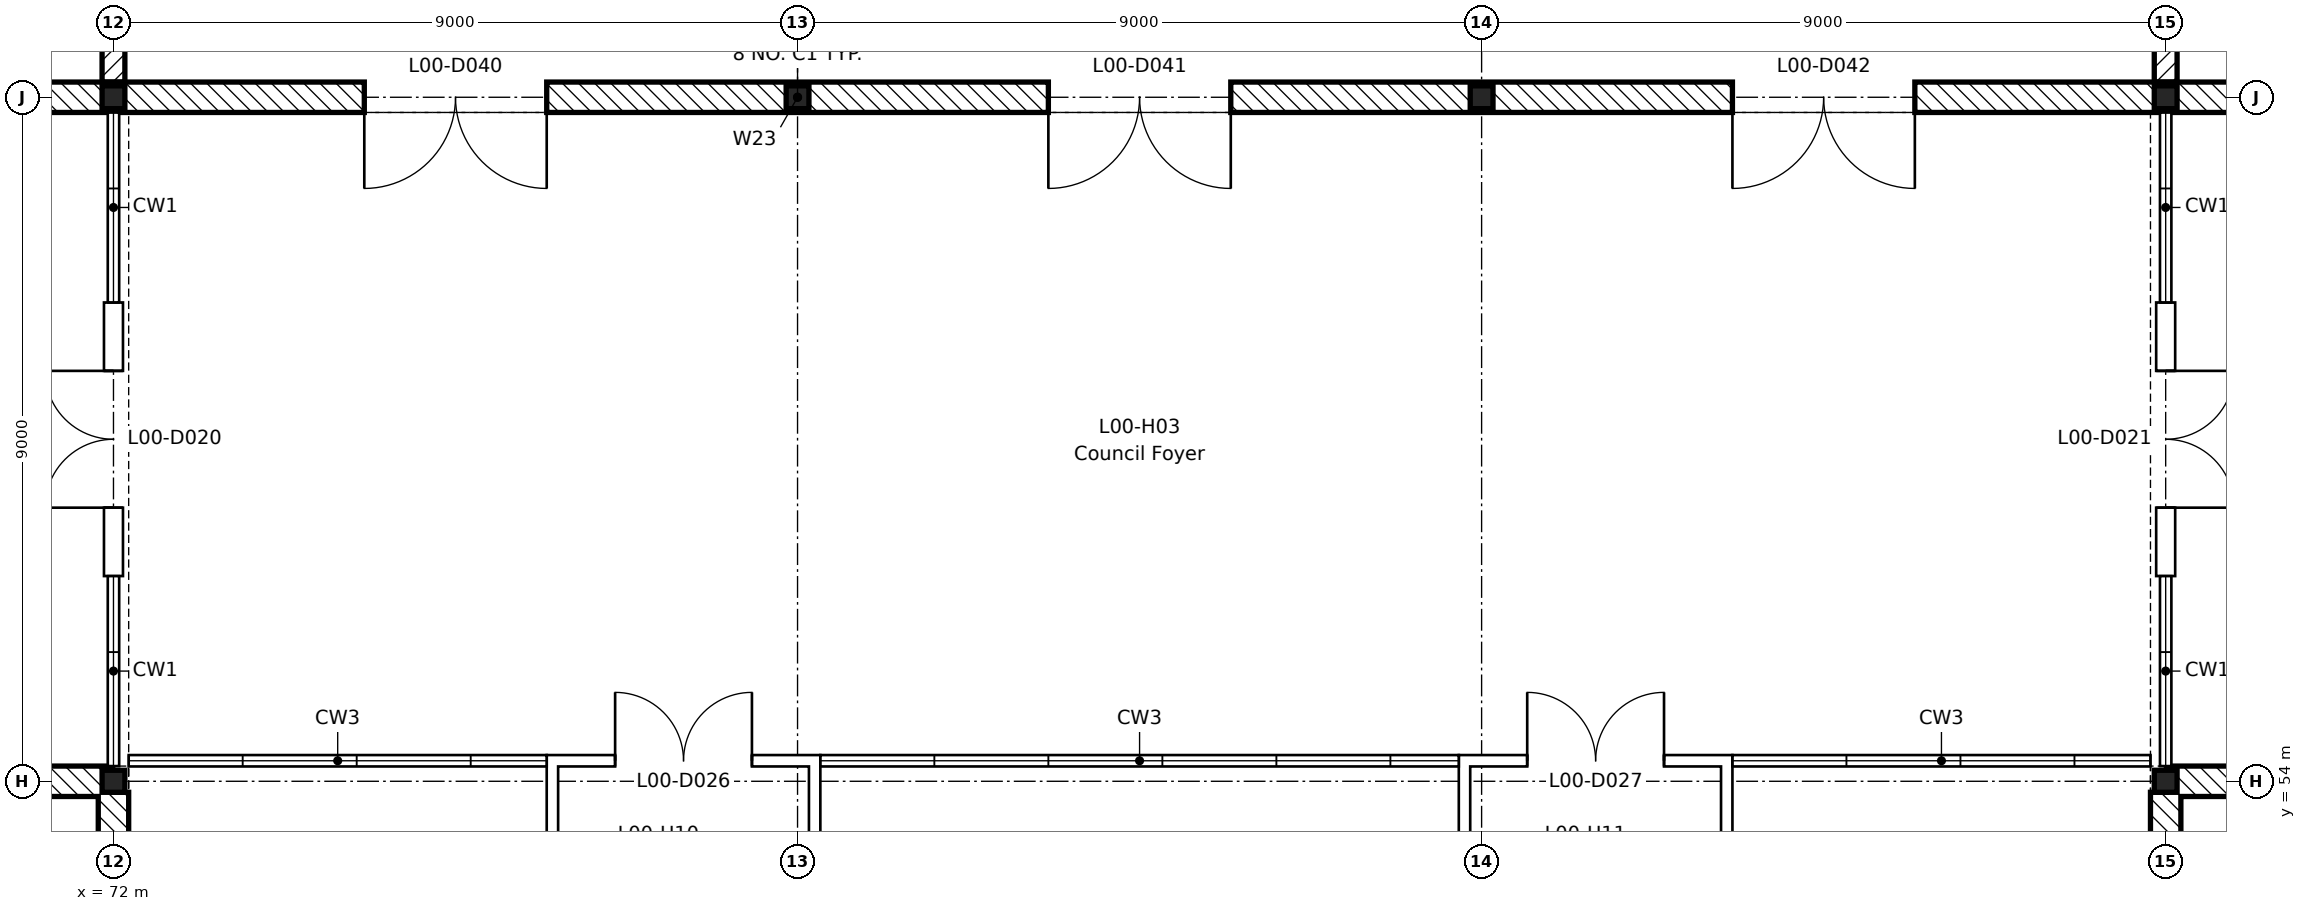
"""IFC4 building model, lengths in metres.
Left out: names, types, materials, properties, quantities, classifications, styles, units other than length and angle.
Written with IfcOpenShell. Run it as: python <this file> out.ifc"""

import sys

from ifc_helpers import new_model, si_unit, direction, frame, frame_2d, origin, origin_2d, place, context, subcontext, project, spatial, rectangle, i_section, extrude, element, fill, save


model = new_model("IFC4")
c1 = context("Model", 3, precision=1e-05, world=origin(), true_north=direction((0.0, 1.0)))
c2 = subcontext(c1, "Body", "Model", "MODEL_VIEW")
j1 = project(units=[si_unit("LENGTHUNIT", "METRE"), si_unit("PLANEANGLEUNIT", "RADIAN")], contexts=[c1])
p1 = place(None, origin())
s1 = spatial("IfcSite", under=j1, at=p1, CompositionType="ELEMENT")
p2 = place(p1, origin())
s2 = spatial("IfcBuilding", under=s1, at=p2, CompositionType="ELEMENT")
p3 = place(p2, origin())
s3 = spatial("IfcBuildingStorey", under=s2, at=p3, CompositionType="ELEMENT", Elevation=0.0)
for number, where, z_axis, x_axis in (
    (1, (72.0, 54.0, -0.6), (0.0, 0.0, 1.0), (1.0, 0.0, 0.0)),
    (2, (99.0, 54.0, -0.6), (0.0, 0.0, 1.0), (1.0, 0.0, 0.0)),
):
    element("IfcColumn", number, at=place(p3, frame(where, z_axis=z_axis, x_axis=x_axis)), inside=s3, PredefinedType="COLUMN", context=c2, shape_type="SweptSolid", body=[
        extrude(i_section(OverallWidth=0.3, OverallDepth=0.29, WebThickness=0.009, FlangeThickness=0.014, FilletRadius=0.027, at=origin_2d()), origin(), (0.0, 0.0, 1.0), 5.8),
    ])
for number, where, z_axis, x_axis in (
    (3, (81.0, 63.0, -0.6), (0.0, 0.0, 1.0), (1.0, 0.0, 0.0)),
    (4, (90.0, 63.0, -0.6), (0.0, 0.0, 1.0), (1.0, 0.0, 0.0)),
    (5, (72.0, 63.0, -0.6), (0.0, 0.0, 1.0), (1.0, 0.0, 0.0)),
    (6, (99.0, 63.0, -0.6), (0.0, 0.0, 1.0), (1.0, 0.0, 0.0)),
):
    element("IfcColumn", number, at=place(p3, frame(where, z_axis=z_axis, x_axis=x_axis)), inside=s3, PredefinedType="COLUMN", context=c2, shape_type="SweptSolid", body=[
        extrude(i_section(OverallWidth=0.3, OverallDepth=0.3, WebThickness=0.011, FlangeThickness=0.019, FilletRadius=0.027, at=origin_2d()), origin(), (0.0, 0.0, 1.0), 5.8),
    ])
p4 = place(p3, frame((72.0, 63.2, 0.0), z_axis=(0.0, 0.0, 1.0), x_axis=(0.0, 1.0, 0.0)))
e7 = element("IfcWall", 7, at=p4, inside=s3, PredefinedType="SHEAR", context=c2, shape_type="SweptSolid", body=[
    extrude(rectangle(XDim=8.95, YDim=0.3, at=frame_2d((4.475, 0.0))), origin(), (0.0, 0.0, 1.0), 5.2),
])
p5 = place(p4, frame((0.85, 0.0, 0.0)))
e8 = element("IfcOpeningElement", 8, at=p5, cuts=e7, PredefinedType="OPENING", context=c2, shape_type="SweptSolid", body=[
    extrude(rectangle(XDim=1.1, YDim=2.1, at=frame_2d((0.55, 1.05))), frame((0.0, 0.16, 0.0), z_axis=(0.0, -1.0, 0.0), x_axis=(1.0, 0.0, 0.0)), (0.0, 0.0, 1.0), 0.32),
])
p6 = place(p3, frame((99.0, 63.2, 0.0), z_axis=(0.0, 0.0, 1.0), x_axis=(0.0, 1.0, 0.0)))
e9 = element("IfcWall", 9, at=p6, inside=s3, PredefinedType="SHEAR", context=c2, shape_type="SweptSolid", body=[
    extrude(rectangle(XDim=8.95, YDim=0.3, at=frame_2d((4.475, 0.0))), origin(), (0.0, 0.0, 1.0), 5.2),
])
p7 = place(p6, frame((0.85, 0.0, 0.0)))
e10 = element("IfcOpeningElement", 10, at=p7, cuts=e9, PredefinedType="OPENING", context=c2, shape_type="SweptSolid", body=[
    extrude(rectangle(XDim=1.1, YDim=2.1, at=frame_2d((0.55, 1.05))), frame((0.0, 0.16, 0.0), z_axis=(0.0, -1.0, 0.0), x_axis=(1.0, 0.0, 0.0)), (0.0, 0.0, 1.0), 0.32),
])
p8 = place(p3, frame((64.509, 54.0, 0.0), z_axis=(0.0, 0.0, 1.0), x_axis=(1.0, 0.0, 0.0)))
e11 = element("IfcWall", 11, at=p8, inside=s3, PredefinedType="STANDARD", context=c2, shape_type="SweptSolid", body=[
    extrude(rectangle(XDim=7.481, YDim=0.4, at=frame_2d((3.741, 0.0))), origin(), (0.0, 0.0, 1.0), 4.87),
])
p9 = place(p8, frame((4.641, 0.0, 0.6)))
e12 = element("IfcOpeningElement", 12, at=p9, cuts=e11, PredefinedType="OPENING", context=c2, shape_type="SweptSolid", body=[
    extrude(rectangle(XDim=1.2, YDim=3.9, at=frame_2d((0.6, 1.95))), frame((0.0, 0.21, 0.0), z_axis=(0.0, -1.0, 0.0), x_axis=(1.0, 0.0, 0.0)), (0.0, 0.0, 1.0), 0.42),
])
p10 = place(p3, frame((72.0, 53.855, 0.0), z_axis=(0.0, 0.0, 1.0), x_axis=(0.0, -1.0, 0.0)))
e13 = element("IfcWall", 13, at=p10, inside=s3, PredefinedType="STANDARD", context=c2, shape_type="SweptSolid", body=[
    extrude(rectangle(XDim=8.71, YDim=0.4, at=frame_2d((4.355, 0.0))), origin(), (0.0, 0.0, 1.0), 4.8),
])
p11 = place(p10, frame((6.005, 0.0, 0.6)))
e14 = element("IfcOpeningElement", 14, at=p11, cuts=e13, PredefinedType="OPENING", context=c2, shape_type="SweptSolid", body=[
    extrude(rectangle(XDim=1.2, YDim=3.9, at=frame_2d((0.6, 1.95))), frame((0.0, 0.21, 0.0), z_axis=(0.0, -1.0, 0.0), x_axis=(1.0, 0.0, 0.0)), (0.0, 0.0, 1.0), 0.42),
])
p12 = place(p10, frame((4.505, 0.0, 0.6)))
e15 = element("IfcOpeningElement", 15, at=p12, cuts=e13, PredefinedType="OPENING", context=c2, shape_type="SweptSolid", body=[
    extrude(rectangle(XDim=1.2, YDim=3.9, at=frame_2d((0.6, 1.95))), frame((0.0, 0.21, 0.0), z_axis=(0.0, -1.0, 0.0), x_axis=(1.0, 0.0, 0.0)), (0.0, 0.0, 1.0), 0.42),
])
p13 = place(p10, frame((3.005, 0.0, 0.6)))
e16 = element("IfcOpeningElement", 16, at=p13, cuts=e13, PredefinedType="OPENING", context=c2, shape_type="SweptSolid", body=[
    extrude(rectangle(XDim=1.2, YDim=3.9, at=frame_2d((0.6, 1.95))), frame((0.0, 0.21, 0.0), z_axis=(0.0, -1.0, 0.0), x_axis=(1.0, 0.0, 0.0)), (0.0, 0.0, 1.0), 0.42),
])
p14 = place(p10, frame((1.505, 0.0, 0.6)))
e17 = element("IfcOpeningElement", 17, at=p14, cuts=e13, PredefinedType="OPENING", context=c2, shape_type="SweptSolid", body=[
    extrude(rectangle(XDim=1.2, YDim=3.9, at=frame_2d((0.6, 1.95))), frame((0.0, 0.21, 0.0), z_axis=(0.0, -1.0, 0.0), x_axis=(1.0, 0.0, 0.0)), (0.0, 0.0, 1.0), 0.42),
])
p15 = place(p3, frame((99.0, 45.145, 0.0), z_axis=(0.0, 0.0, 1.0), x_axis=(0.0, 1.0, 0.0)))
e18 = element("IfcWall", 18, at=p15, inside=s3, PredefinedType="STANDARD", context=c2, shape_type="SweptSolid", body=[
    extrude(rectangle(XDim=8.71, YDim=0.4, at=frame_2d((4.355, 0.0))), origin(), (0.0, 0.0, 1.0), 4.8),
])
p16 = place(p15, frame((1.505, 0.0, 0.6)))
e19 = element("IfcOpeningElement", 19, at=p16, cuts=e18, PredefinedType="OPENING", context=c2, shape_type="SweptSolid", body=[
    extrude(rectangle(XDim=1.2, YDim=3.9, at=frame_2d((0.6, 1.95))), frame((0.0, 0.21, 0.0), z_axis=(0.0, -1.0, 0.0), x_axis=(1.0, 0.0, 0.0)), (0.0, 0.0, 1.0), 0.42),
])
p17 = place(p15, frame((3.005, 0.0, 0.6)))
e20 = element("IfcOpeningElement", 20, at=p17, cuts=e18, PredefinedType="OPENING", context=c2, shape_type="SweptSolid", body=[
    extrude(rectangle(XDim=1.2, YDim=3.9, at=frame_2d((0.6, 1.95))), frame((0.0, 0.21, 0.0), z_axis=(0.0, -1.0, 0.0), x_axis=(1.0, 0.0, 0.0)), (0.0, 0.0, 1.0), 0.42),
])
p18 = place(p15, frame((4.505, 0.0, 0.6)))
e21 = element("IfcOpeningElement", 21, at=p18, cuts=e18, PredefinedType="OPENING", context=c2, shape_type="SweptSolid", body=[
    extrude(rectangle(XDim=1.2, YDim=3.9, at=frame_2d((0.6, 1.95))), frame((0.0, 0.21, 0.0), z_axis=(0.0, -1.0, 0.0), x_axis=(1.0, 0.0, 0.0)), (0.0, 0.0, 1.0), 0.42),
])
p19 = place(p15, frame((6.005, 0.0, 0.6)))
e22 = element("IfcOpeningElement", 22, at=p19, cuts=e18, PredefinedType="OPENING", context=c2, shape_type="SweptSolid", body=[
    extrude(rectangle(XDim=1.2, YDim=3.9, at=frame_2d((0.6, 1.95))), frame((0.0, 0.21, 0.0), z_axis=(0.0, -1.0, 0.0), x_axis=(1.0, 0.0, 0.0)), (0.0, 0.0, 1.0), 0.42),
])
p20 = place(p3, frame((99.009, 54.0, 0.0), z_axis=(0.0, 0.0, 1.0), x_axis=(1.0, 0.0, 0.0)))
e23 = element("IfcWall", 23, at=p20, inside=s3, PredefinedType="STANDARD", context=c2, shape_type="SweptSolid", body=[
    extrude(rectangle(XDim=7.481, YDim=0.4, at=frame_2d((3.741, 0.0))), origin(), (0.0, 0.0, 1.0), 4.87),
])
p21 = place(p20, frame((1.641, 0.0, 0.6)))
e24 = element("IfcOpeningElement", 24, at=p21, cuts=e23, PredefinedType="OPENING", context=c2, shape_type="SweptSolid", body=[
    extrude(rectangle(XDim=1.2, YDim=3.9, at=frame_2d((0.6, 1.95))), frame((0.0, 0.21, 0.0), z_axis=(0.0, -1.0, 0.0), x_axis=(1.0, 0.0, 0.0)), (0.0, 0.0, 1.0), 0.42),
])
p22 = place(p3, frame((72.0, 56.7, 0.0), z_axis=(0.0, 0.0, 1.0), x_axis=(0.0, 1.0, 0.0)))
e25 = element("IfcWall", 25, at=p22, inside=s3, PredefinedType="STANDARD", context=c2, shape_type="SweptSolid", body=[
    extrude(rectangle(XDim=3.6, YDim=0.25, at=frame_2d((1.8, 0.0))), origin(), (0.0, 0.0, 1.0), 5.2),
])
p23 = place(p22, frame((0.9, 0.0, 0.0)))
e26 = element("IfcOpeningElement", 26, at=p23, cuts=e25, PredefinedType="OPENING", context=c2, shape_type="SweptSolid", body=[
    extrude(rectangle(XDim=1.8, YDim=2.4, at=frame_2d((0.9, 1.2))), frame((0.0, 0.135, 0.0), z_axis=(0.0, -1.0, 0.0), x_axis=(1.0, 0.0, 0.0)), (0.0, 0.0, 1.0), 0.27),
])
p24 = place(p3, frame((99.0, 60.3, 0.0), z_axis=(0.0, 0.0, 1.0), x_axis=(0.0, -1.0, 0.0)))
e27 = element("IfcWall", 27, at=p24, inside=s3, PredefinedType="STANDARD", context=c2, shape_type="SweptSolid", body=[
    extrude(rectangle(XDim=3.6, YDim=0.25, at=frame_2d((1.8, 0.0))), origin(), (0.0, 0.0, 1.0), 5.2),
])
p25 = place(p24, frame((0.9, 0.0, 0.0)))
e28 = element("IfcOpeningElement", 28, at=p25, cuts=e27, PredefinedType="OPENING", context=c2, shape_type="SweptSolid", body=[
    extrude(rectangle(XDim=1.8, YDim=2.4, at=frame_2d((0.9, 1.2))), frame((0.0, 0.135, 0.0), z_axis=(0.0, -1.0, 0.0), x_axis=(1.0, 0.0, 0.0)), (0.0, 0.0, 1.0), 0.27),
])
p26 = place(p3, frame((77.7, 54.27, 0.0), z_axis=(0.0, 0.0, 1.0), x_axis=(1.0, 0.0, 0.0)))
e29 = element("IfcWall", 29, at=p26, inside=s3, PredefinedType="STANDARD", context=c2, shape_type="SweptSolid", body=[
    extrude(rectangle(XDim=3.6, YDim=0.15, at=frame_2d((1.8, 0.0))), origin(), (0.0, 0.0, 1.0), 4.8),
])
p27 = place(p26, frame((0.9, 0.0, 0.0)))
e30 = element("IfcOpeningElement", 30, at=p27, cuts=e29, PredefinedType="OPENING", context=c2, shape_type="SweptSolid", body=[
    extrude(rectangle(XDim=1.8, YDim=2.4, at=frame_2d((0.9, 1.2))), frame((0.0, 0.085, 0.0), z_axis=(0.0, -1.0, 0.0), x_axis=(1.0, 0.0, 0.0)), (0.0, 0.0, 1.0), 0.17),
])
p28 = place(p3, frame((89.7, 54.27, 0.0), z_axis=(0.0, 0.0, 1.0), x_axis=(1.0, 0.0, 0.0)))
e31 = element("IfcWall", 31, at=p28, inside=s3, PredefinedType="STANDARD", context=c2, shape_type="SweptSolid", body=[
    extrude(rectangle(XDim=3.6, YDim=0.15, at=frame_2d((1.8, 0.0))), origin(), (0.0, 0.0, 1.0), 4.8),
])
p29 = place(p28, frame((0.9, 0.0, 0.0)))
e32 = element("IfcOpeningElement", 32, at=p29, cuts=e31, PredefinedType="OPENING", context=c2, shape_type="SweptSolid", body=[
    extrude(rectangle(XDim=1.8, YDim=2.4, at=frame_2d((0.9, 1.2))), frame((0.0, 0.085, 0.0), z_axis=(0.0, -1.0, 0.0), x_axis=(1.0, 0.0, 0.0)), (0.0, 0.0, 1.0), 0.17),
])
for number, where, z_axis, x_axis in (
    (33, (77.775, 51.795, 0.0), (0.0, 0.0, 1.0), (0.0, 1.0, 0.0)),
    (34, (81.225, 51.795, 0.0), (0.0, 0.0, 1.0), (0.0, 1.0, 0.0)),
    (35, (89.775, 51.795, 0.0), (0.0, 0.0, 1.0), (0.0, 1.0, 0.0)),
    (36, (93.225, 51.795, 0.0), (0.0, 0.0, 1.0), (0.0, 1.0, 0.0)),
):
    element("IfcWall", number, at=place(p3, frame(where, z_axis=z_axis, x_axis=x_axis)), inside=s3, PredefinedType="STANDARD", context=c2, shape_type="SweptSolid", body=[
        extrude(rectangle(XDim=2.4, YDim=0.15, at=frame_2d((1.2, 0.0))), origin(), (0.0, 0.0, 1.0), 3.0),
    ])
p30 = place(p3, frame((67.6, 63.0, 0.0), z_axis=(0.0, 0.0, 1.0), x_axis=(1.0, 0.0, 0.0)))
e37 = element("IfcWall", 37, at=p30, inside=s3, PredefinedType="STANDARD", context=c2, shape_type="SweptSolid", body=[
    extrude(rectangle(XDim=4.4, YDim=0.4, at=frame_2d((2.2, 0.0))), origin(), (0.0, 0.0, 1.0), 5.2),
])
p31 = place(p3, frame((72.0, 63.0, 0.0), z_axis=(0.0, 0.0, 1.0), x_axis=(1.0, 0.0, 0.0)))
e38 = element("IfcWall", 38, at=p31, inside=s3, PredefinedType="STANDARD", context=c2, shape_type="SweptSolid", body=[
    extrude(rectangle(XDim=27.0, YDim=0.4, at=frame_2d((13.5, 0.0))), origin(), (0.0, 0.0, 1.0), 4.71),
])
p32 = place(p31, frame((3.3, 0.0, 0.0)))
e39 = element("IfcOpeningElement", 39, at=p32, cuts=e38, PredefinedType="OPENING", context=c2, shape_type="SweptSolid", body=[
    extrude(rectangle(XDim=2.4, YDim=2.4, at=frame_2d((1.2, 1.2))), frame((0.0, 0.21, 0.0), z_axis=(0.0, -1.0, 0.0), x_axis=(1.0, 0.0, 0.0)), (0.0, 0.0, 1.0), 0.42),
])
p33 = place(p31, frame((12.3, 0.0, 0.0)))
e40 = element("IfcOpeningElement", 40, at=p33, cuts=e38, PredefinedType="OPENING", context=c2, shape_type="SweptSolid", body=[
    extrude(rectangle(XDim=2.4, YDim=2.4, at=frame_2d((1.2, 1.2))), frame((0.0, 0.21, 0.0), z_axis=(0.0, -1.0, 0.0), x_axis=(1.0, 0.0, 0.0)), (0.0, 0.0, 1.0), 0.42),
])
p34 = place(p31, frame((21.3, 0.0, 0.0)))
e41 = element("IfcOpeningElement", 41, at=p34, cuts=e38, PredefinedType="OPENING", context=c2, shape_type="SweptSolid", body=[
    extrude(rectangle(XDim=2.4, YDim=2.4, at=frame_2d((1.2, 1.2))), frame((0.0, 0.21, 0.0), z_axis=(0.0, -1.0, 0.0), x_axis=(1.0, 0.0, 0.0)), (0.0, 0.0, 1.0), 0.42),
])
p35 = place(p3, frame((99.0, 63.0, 0.0), z_axis=(0.0, 0.0, 1.0), x_axis=(1.0, 0.0, 0.0)))
e42 = element("IfcWall", 42, at=p35, inside=s3, PredefinedType="STANDARD", context=c2, shape_type="SweptSolid", body=[
    extrude(rectangle(XDim=4.4, YDim=0.4, at=frame_2d((2.2, 0.0))), origin(), (0.0, 0.0, 1.0), 5.2),
])
p36 = place(p23, origin())
e43 = element("IfcDoor", 43, at=p36, inside=s3, OperationType="DOUBLE_DOOR_SINGLE_SWING", PredefinedType="DOOR", context=c2, shape_type="SweptSolid", body=[
    extrude(rectangle(XDim=1.8, YDim=2.4, at=frame_2d((0.9, 1.2))), frame((0.0, 0.025, 0.0), z_axis=(0.0, -1.0, 0.0), x_axis=(1.0, 0.0, 0.0)), (0.0, 0.0, 1.0), 0.05),
])
fill(e26, e43)
p37 = place(p25, origin())
e44 = element("IfcDoor", 44, at=p37, inside=s3, OperationType="DOUBLE_DOOR_SINGLE_SWING", PredefinedType="DOOR", context=c2, shape_type="SweptSolid", body=[
    extrude(rectangle(XDim=1.8, YDim=2.4, at=frame_2d((0.9, 1.2))), frame((0.0, 0.025, 0.0), z_axis=(0.0, -1.0, 0.0), x_axis=(1.0, 0.0, 0.0)), (0.0, 0.0, 1.0), 0.05),
])
fill(e28, e44)
p38 = place(p27, origin())
e45 = element("IfcDoor", 45, at=p38, inside=s3, OperationType="DOUBLE_DOOR_SINGLE_SWING", PredefinedType="DOOR", context=c2, shape_type="SweptSolid", body=[
    extrude(rectangle(XDim=1.8, YDim=2.4, at=frame_2d((0.9, 1.2))), frame((0.0, 0.025, 0.0), z_axis=(0.0, -1.0, 0.0), x_axis=(1.0, 0.0, 0.0)), (0.0, 0.0, 1.0), 0.05),
])
fill(e30, e45)
p39 = place(p29, origin())
e46 = element("IfcDoor", 46, at=p39, inside=s3, OperationType="DOUBLE_DOOR_SINGLE_SWING", PredefinedType="DOOR", context=c2, shape_type="SweptSolid", body=[
    extrude(rectangle(XDim=1.8, YDim=2.4, at=frame_2d((0.9, 1.2))), frame((0.0, 0.025, 0.0), z_axis=(0.0, -1.0, 0.0), x_axis=(1.0, 0.0, 0.0)), (0.0, 0.0, 1.0), 0.05),
])
fill(e32, e46)
p40 = place(p32, frame((2.4, 0.0, 0.0), z_axis=(0.0, 0.0, 1.0), x_axis=(-1.0, 0.0, 0.0)))
e47 = element("IfcDoor", 47, at=p40, inside=s3, OperationType="DOUBLE_DOOR_SINGLE_SWING", PredefinedType="DOOR", context=c2, shape_type="SweptSolid", body=[
    extrude(rectangle(XDim=2.4, YDim=2.4, at=frame_2d((1.2, 1.2))), frame((0.0, 0.025, 0.0), z_axis=(0.0, -1.0, 0.0), x_axis=(1.0, 0.0, 0.0)), (0.0, 0.0, 1.0), 0.05),
])
fill(e39, e47)
p41 = place(p33, frame((2.4, 0.0, 0.0), z_axis=(0.0, 0.0, 1.0), x_axis=(-1.0, 0.0, 0.0)))
e48 = element("IfcDoor", 48, at=p41, inside=s3, OperationType="DOUBLE_DOOR_SINGLE_SWING", PredefinedType="DOOR", context=c2, shape_type="SweptSolid", body=[
    extrude(rectangle(XDim=2.4, YDim=2.4, at=frame_2d((1.2, 1.2))), frame((0.0, 0.025, 0.0), z_axis=(0.0, -1.0, 0.0), x_axis=(1.0, 0.0, 0.0)), (0.0, 0.0, 1.0), 0.05),
])
fill(e40, e48)
p42 = place(p34, frame((2.4, 0.0, 0.0), z_axis=(0.0, 0.0, 1.0), x_axis=(-1.0, 0.0, 0.0)))
e49 = element("IfcDoor", 49, at=p42, inside=s3, OperationType="DOUBLE_DOOR_SINGLE_SWING", PredefinedType="DOOR", context=c2, shape_type="SweptSolid", body=[
    extrude(rectangle(XDim=2.4, YDim=2.4, at=frame_2d((1.2, 1.2))), frame((0.0, 0.025, 0.0), z_axis=(0.0, -1.0, 0.0), x_axis=(1.0, 0.0, 0.0)), (0.0, 0.0, 1.0), 0.05),
])
fill(e41, e49)
save(model, sys.argv[1])
